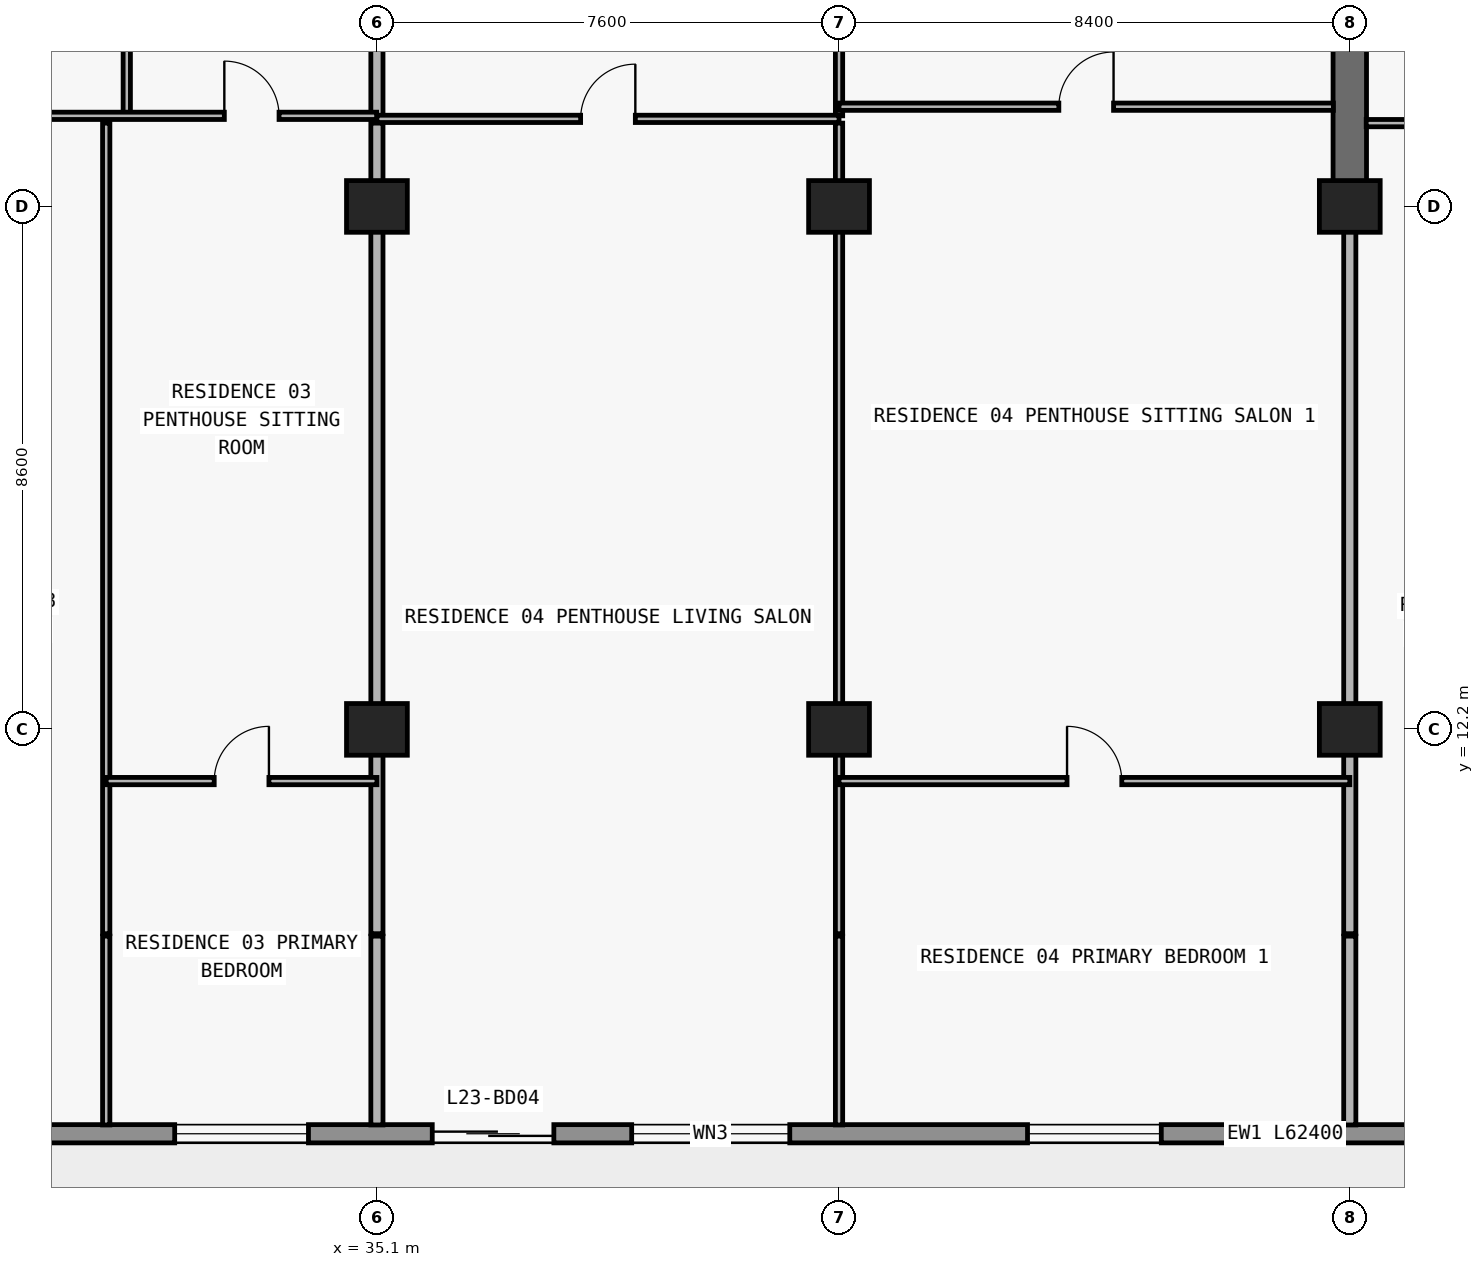
"""IFC4 building model, lengths in metres.
Left out: names, types, materials, properties, quantities, classifications, styles, units other than length and angle.
Written with IfcOpenShell. Run it as: python <this file> out.ifc"""

import sys

from ifc_helpers import new_model, si_unit, direction, frame, frame_2d, origin, origin_2d, place, context, subcontext, project, spatial, rectangle, extrude, element, fill, save


model = new_model("IFC4")
c1 = context("Model", 3, precision=1e-05, world=origin(), true_north=direction((0.0, 1.0)))
c2 = subcontext(c1, "Body", "Model", "MODEL_VIEW")
j1 = project(units=[si_unit("LENGTHUNIT", "METRE"), si_unit("PLANEANGLEUNIT", "RADIAN")], contexts=[c1])
p1 = place(None, origin())
s1 = spatial("IfcSite", under=j1, at=p1, CompositionType="ELEMENT")
p2 = place(p1, origin())
s2 = spatial("IfcBuilding", under=s1, at=p2, CompositionType="ELEMENT")
p3 = place(p2, frame((0.0, 0.0, 87.9)))
s3 = spatial("IfcBuildingStorey", under=s2, at=p3, CompositionType="ELEMENT", Elevation=87.9)
for number, where, z_axis, x_axis in (
    (1, (35.1, 12.2, 0.0), (0.0, 0.0, 1.0), (1.0, 0.0, 0.0)),
    (2, (42.7, 12.2, 0.0), (0.0, 0.0, 1.0), (1.0, 0.0, 0.0)),
    (3, (51.1, 12.2, 0.0), (0.0, 0.0, 1.0), (1.0, 0.0, 0.0)),
    (4, (35.1, 20.8, 0.0), (0.0, 0.0, 1.0), (1.0, 0.0, 0.0)),
    (5, (42.7, 20.8, 0.0), (0.0, 0.0, 1.0), (1.0, 0.0, 0.0)),
    (6, (51.1, 20.8, 0.0), (0.0, 0.0, 1.0), (1.0, 0.0, 0.0)),
):
    element("IfcColumn", number, at=place(p3, frame(where, z_axis=z_axis, x_axis=x_axis)), inside=s3, PredefinedType="COLUMN", context=c2, shape_type="SweptSolid", body=[
        extrude(rectangle(XDim=1.0, YDim=0.85, at=origin_2d()), origin(), (0.0, 0.0, 1.0), 3.05),
    ])
p4 = place(p3, frame((51.1, 20.8, 0.0), z_axis=(0.0, 0.0, 1.0), x_axis=(0.0, 1.0, 0.0)))
e7 = element("IfcWall", 7, at=p4, inside=s3, PredefinedType="SHEAR", context=c2, shape_type="SweptSolid", body=[
    extrude(rectangle(XDim=8.6, YDim=0.55, at=frame_2d((4.3, 0.0))), origin(), (0.0, 0.0, 1.0), 3.05),
])
p5 = place(p3, frame((70.1, 5.55, 0.0), z_axis=(0.0, 0.0, 1.0), x_axis=(-1.0, 0.0, 0.0)))
e8 = element("IfcWall", 8, at=p5, inside=s3, PredefinedType="STANDARD", context=c2, shape_type="SweptSolid", body=[
    extrude(rectangle(XDim=62.4, YDim=0.3, at=frame_2d((31.2, 0.0))), origin(), (0.0, 0.0, 1.0), 3.05),
])
p6 = place(p5, frame((57.226, 0.0, 0.0)))
e9 = element("IfcOpeningElement", 9, at=p6, cuts=e8, PredefinedType="OPENING", context=c2, shape_type="SweptSolid", body=[
    extrude(rectangle(XDim=2.0, YDim=2.3, at=frame_2d((1.0, 1.15))), frame((0.0, 0.16, 0.0), z_axis=(0.0, -1.0, 0.0), x_axis=(1.0, 0.0, 0.0)), (0.0, 0.0, 1.0), 0.32),
])
p7 = place(p5, frame((52.926, 0.0, 0.85)))
e10 = element("IfcOpeningElement", 10, at=p7, cuts=e8, PredefinedType="OPENING", context=c2, shape_type="SweptSolid", body=[
    extrude(rectangle(XDim=2.2, YDim=1.55, at=frame_2d((1.1, 0.775))), frame((0.0, 0.16, 0.0), z_axis=(0.0, -1.0, 0.0), x_axis=(1.0, 0.0, 0.0)), (0.0, 0.0, 1.0), 0.32),
])
p8 = place(p5, frame((48.49, 0.0, 0.0)))
e11 = element("IfcOpeningElement", 11, at=p8, cuts=e8, PredefinedType="OPENING", context=c2, shape_type="SweptSolid", body=[
    extrude(rectangle(XDim=2.0, YDim=2.3, at=frame_2d((1.0, 1.15))), frame((0.0, 0.16, 0.0), z_axis=(0.0, -1.0, 0.0), x_axis=(1.0, 0.0, 0.0)), (0.0, 0.0, 1.0), 0.32),
])
p9 = place(p5, frame((44.39, 0.0, 0.85)))
e12 = element("IfcOpeningElement", 12, at=p9, cuts=e8, PredefinedType="OPENING", context=c2, shape_type="SweptSolid", body=[
    extrude(rectangle(XDim=1.8, YDim=1.55, at=frame_2d((0.9, 0.775))), frame((0.0, 0.16, 0.0), z_axis=(0.0, -1.0, 0.0), x_axis=(1.0, 0.0, 0.0)), (0.0, 0.0, 1.0), 0.32),
])
p10 = place(p5, frame((40.426, 0.0, 0.0)))
e13 = element("IfcOpeningElement", 13, at=p10, cuts=e8, PredefinedType="OPENING", context=c2, shape_type="SweptSolid", body=[
    extrude(rectangle(XDim=2.0, YDim=2.3, at=frame_2d((1.0, 1.15))), frame((0.0, 0.16, 0.0), z_axis=(0.0, -1.0, 0.0), x_axis=(1.0, 0.0, 0.0)), (0.0, 0.0, 1.0), 0.32),
])
p11 = place(p5, frame((36.126, 0.0, 0.85)))
e14 = element("IfcOpeningElement", 14, at=p11, cuts=e8, PredefinedType="OPENING", context=c2, shape_type="SweptSolid", body=[
    extrude(rectangle(XDim=2.2, YDim=1.55, at=frame_2d((1.1, 0.775))), frame((0.0, 0.16, 0.0), z_axis=(0.0, -1.0, 0.0), x_axis=(1.0, 0.0, 0.0)), (0.0, 0.0, 1.0), 0.32),
])
p12 = place(p5, frame((32.09, 0.0, 0.0)))
e15 = element("IfcOpeningElement", 15, at=p12, cuts=e8, PredefinedType="OPENING", context=c2, shape_type="SweptSolid", body=[
    extrude(rectangle(XDim=2.0, YDim=2.3, at=frame_2d((1.0, 1.15))), frame((0.0, 0.16, 0.0), z_axis=(0.0, -1.0, 0.0), x_axis=(1.0, 0.0, 0.0)), (0.0, 0.0, 1.0), 0.32),
])
p13 = place(p5, frame((28.21, 0.0, 0.65)))
e16 = element("IfcOpeningElement", 16, at=p13, cuts=e8, PredefinedType="OPENING", context=c2, shape_type="SweptSolid", body=[
    extrude(rectangle(XDim=2.6, YDim=1.85, at=frame_2d((1.3, 0.925))), frame((0.0, 0.16, 0.0), z_axis=(0.0, -1.0, 0.0), x_axis=(1.0, 0.0, 0.0)), (0.0, 0.0, 1.0), 0.32),
])
p14 = place(p5, frame((22.1, 0.0, 0.85)))
e17 = element("IfcOpeningElement", 17, at=p14, cuts=e8, PredefinedType="OPENING", context=c2, shape_type="SweptSolid", body=[
    extrude(rectangle(XDim=2.2, YDim=1.55, at=frame_2d((1.1, 0.775))), frame((0.0, 0.16, 0.0), z_axis=(0.0, -1.0, 0.0), x_axis=(1.0, 0.0, 0.0)), (0.0, 0.0, 1.0), 0.32),
])
p15 = place(p5, frame((16.026, 0.0, 0.0)))
e18 = element("IfcOpeningElement", 18, at=p15, cuts=e8, PredefinedType="OPENING", context=c2, shape_type="SweptSolid", body=[
    extrude(rectangle(XDim=2.0, YDim=2.3, at=frame_2d((1.0, 1.15))), frame((0.0, 0.16, 0.0), z_axis=(0.0, -1.0, 0.0), x_axis=(1.0, 0.0, 0.0)), (0.0, 0.0, 1.0), 0.32),
])
p16 = place(p5, frame((11.726, 0.0, 0.85)))
e19 = element("IfcOpeningElement", 19, at=p16, cuts=e8, PredefinedType="OPENING", context=c2, shape_type="SweptSolid", body=[
    extrude(rectangle(XDim=2.2, YDim=1.55, at=frame_2d((1.1, 0.775))), frame((0.0, 0.16, 0.0), z_axis=(0.0, -1.0, 0.0), x_axis=(1.0, 0.0, 0.0)), (0.0, 0.0, 1.0), 0.32),
])
p17 = place(p5, frame((7.29, 0.0, 0.0)))
e20 = element("IfcOpeningElement", 20, at=p17, cuts=e8, PredefinedType="OPENING", context=c2, shape_type="SweptSolid", body=[
    extrude(rectangle(XDim=2.0, YDim=2.3, at=frame_2d((1.0, 1.15))), frame((0.0, 0.16, 0.0), z_axis=(0.0, -1.0, 0.0), x_axis=(1.0, 0.0, 0.0)), (0.0, 0.0, 1.0), 0.32),
])
p18 = place(p5, frame((3.19, 0.0, 0.85)))
e21 = element("IfcOpeningElement", 21, at=p18, cuts=e8, PredefinedType="OPENING", context=c2, shape_type="SweptSolid", body=[
    extrude(rectangle(XDim=1.8, YDim=1.55, at=frame_2d((0.9, 0.775))), frame((0.0, 0.16, 0.0), z_axis=(0.0, -1.0, 0.0), x_axis=(1.0, 0.0, 0.0)), (0.0, 0.0, 1.0), 0.32),
])
p19 = place(p3, frame((30.648, 5.695, 0.0), z_axis=(0.0, 0.0, 1.0), x_axis=(0.0, 1.0, 0.0)))
e22 = element("IfcWall", 22, at=p19, inside=s3, PredefinedType="PARTITIONING", context=c2, shape_type="SweptSolid", body=[
    extrude(rectangle(XDim=3.105, YDim=0.12, at=frame_2d((1.552, 0.0))), origin(), (0.0, 0.0, 1.0), 3.05),
])
p20 = place(p3, frame((30.648, 8.84, 0.0), z_axis=(0.0, 0.0, 1.0), x_axis=(0.0, 1.0, 0.0)))
e23 = element("IfcWall", 23, at=p20, inside=s3, PredefinedType="PARTITIONING", context=c2, shape_type="SweptSolid", body=[
    extrude(rectangle(XDim=13.33, YDim=0.12, at=frame_2d((6.665, 0.0))), origin(), (0.0, 0.0, 1.0), 3.05),
])
p21 = place(p3, frame((30.986, 22.29, 0.0), z_axis=(0.0, 0.0, 1.0), x_axis=(0.0, 1.0, 0.0)))
e24 = element("IfcWall", 24, at=p21, inside=s3, PredefinedType="PARTITIONING", context=c2, shape_type="SweptSolid", body=[
    extrude(rectangle(XDim=4.69, YDim=0.12, at=frame_2d((2.345, 0.0))), origin(), (0.0, 0.0, 1.0), 3.05),
])
p22 = place(p21, frame((1.895, 0.0, 0.0)))
e25 = element("IfcOpeningElement", 25, at=p22, cuts=e24, PredefinedType="OPENING", context=c2, shape_type="SweptSolid", body=[
    extrude(rectangle(XDim=0.9, YDim=2.15, at=frame_2d((0.45, 1.075))), frame((0.0, 0.07, 0.0), z_axis=(0.0, -1.0, 0.0), x_axis=(1.0, 0.0, 0.0)), (0.0, 0.0, 1.0), 0.14),
])
p23 = place(p3, frame((35.1, 5.695, 0.0), z_axis=(0.0, 0.0, 1.0), x_axis=(0.0, 1.0, 0.0)))
e26 = element("IfcWall", 26, at=p23, inside=s3, PredefinedType="PARTITIONING", context=c2, shape_type="SweptSolid", body=[
    extrude(rectangle(XDim=3.105, YDim=0.2, at=frame_2d((1.552, 0.0))), origin(), (0.0, 0.0, 1.0), 3.05),
])
p24 = place(p3, frame((35.1, 8.84, 0.0), z_axis=(0.0, 0.0, 1.0), x_axis=(0.0, 1.0, 0.0)))
e27 = element("IfcWall", 27, at=p24, inside=s3, PredefinedType="PARTITIONING", context=c2, shape_type="SweptSolid", body=[
    extrude(rectangle(XDim=13.33, YDim=0.2, at=frame_2d((6.665, 0.0))), origin(), (0.0, 0.0, 1.0), 2.174),
])
p25 = place(p3, frame((35.1, 22.29, 0.0), z_axis=(0.0, 0.0, 1.0), x_axis=(0.0, 1.0, 0.0)))
e28 = element("IfcWall", 28, at=p25, inside=s3, PredefinedType="PARTITIONING", context=c2, shape_type="SweptSolid", body=[
    extrude(rectangle(XDim=4.69, YDim=0.2, at=frame_2d((2.345, 0.0))), origin(), (0.0, 0.0, 1.0), 2.174),
])
p26 = place(p3, frame((42.7, 5.695, 0.0), z_axis=(0.0, 0.0, 1.0), x_axis=(0.0, 1.0, 0.0)))
e29 = element("IfcWall", 29, at=p26, inside=s3, PredefinedType="PARTITIONING", context=c2, shape_type="SweptSolid", body=[
    extrude(rectangle(XDim=3.105, YDim=0.12, at=frame_2d((1.552, 0.0))), origin(), (0.0, 0.0, 1.0), 3.05),
])
p27 = place(p3, frame((42.7, 8.84, 0.0), z_axis=(0.0, 0.0, 1.0), x_axis=(0.0, 1.0, 0.0)))
e30 = element("IfcWall", 30, at=p27, inside=s3, PredefinedType="PARTITIONING", context=c2, shape_type="SweptSolid", body=[
    extrude(rectangle(XDim=13.33, YDim=0.12, at=frame_2d((6.665, 0.0))), origin(), (0.0, 0.0, 1.0), 2.174),
])
p28 = place(p3, frame((42.7, 22.29, 0.0), z_axis=(0.0, 0.0, 1.0), x_axis=(0.0, 1.0, 0.0)))
e31 = element("IfcWall", 31, at=p28, inside=s3, PredefinedType="PARTITIONING", context=c2, shape_type="SweptSolid", body=[
    extrude(rectangle(XDim=4.69, YDim=0.12, at=frame_2d((2.345, 0.0))), origin(), (0.0, 0.0, 1.0), 2.174),
])
p29 = place(p28, frame((1.9, 0.0, 0.0)))
e32 = element("IfcOpeningElement", 32, at=p29, cuts=e31, PredefinedType="OPENING", context=c2, shape_type="SweptSolid", body=[
    extrude(rectangle(XDim=0.9, YDim=2.124, at=frame_2d((0.45, 1.062))), frame((0.0, 0.07, 0.0), z_axis=(0.0, -1.0, 0.0), x_axis=(1.0, 0.0, 0.0)), (0.0, 0.0, 1.0), 0.14),
])
p30 = place(p3, frame((51.1, 5.695, 0.0), z_axis=(0.0, 0.0, 1.0), x_axis=(0.0, 1.0, 0.0)))
e33 = element("IfcWall", 33, at=p30, inside=s3, PredefinedType="PARTITIONING", context=c2, shape_type="SweptSolid", body=[
    extrude(rectangle(XDim=3.105, YDim=0.2, at=frame_2d((1.552, 0.0))), origin(), (0.0, 0.0, 1.0), 3.05),
])
p31 = place(p3, frame((51.1, 8.84, 0.0), z_axis=(0.0, 0.0, 1.0), x_axis=(0.0, 1.0, 0.0)))
e34 = element("IfcWall", 34, at=p31, inside=s3, PredefinedType="PARTITIONING", context=c2, shape_type="SweptSolid", body=[
    extrude(rectangle(XDim=11.955, YDim=0.2, at=frame_2d((5.978, 0.0))), origin(), (0.0, 0.0, 1.0), 2.174),
])
p32 = place(p3, frame((30.648, 11.35, 0.0), z_axis=(0.0, 0.0, 1.0), x_axis=(1.0, 0.0, 0.0)))
e35 = element("IfcWall", 35, at=p32, inside=s3, PredefinedType="PARTITIONING", context=c2, shape_type="SweptSolid", body=[
    extrude(rectangle(XDim=4.452, YDim=0.12, at=frame_2d((2.226, 0.0))), origin(), (0.0, 0.0, 1.0), 3.05),
])
p33 = place(p32, frame((1.776, 0.0, 0.0)))
e36 = element("IfcOpeningElement", 36, at=p33, cuts=e35, PredefinedType="OPENING", context=c2, shape_type="SweptSolid", body=[
    extrude(rectangle(XDim=0.9, YDim=2.15, at=frame_2d((0.45, 1.075))), frame((0.0, 0.07, 0.0), z_axis=(0.0, -1.0, 0.0), x_axis=(1.0, 0.0, 0.0)), (0.0, 0.0, 1.0), 0.14),
])
p34 = place(p3, frame((42.7, 11.35, 0.0), z_axis=(0.0, 0.0, 1.0), x_axis=(1.0, 0.0, 0.0)))
e37 = element("IfcWall", 37, at=p34, inside=s3, PredefinedType="PARTITIONING", context=c2, shape_type="SweptSolid", body=[
    extrude(rectangle(XDim=8.4, YDim=0.12, at=frame_2d((4.2, 0.0))), origin(), (0.0, 0.0, 1.0), 3.05),
])
p35 = place(p34, frame((3.75, 0.0, 0.0)))
e38 = element("IfcOpeningElement", 38, at=p35, cuts=e37, PredefinedType="OPENING", context=c2, shape_type="SweptSolid", body=[
    extrude(rectangle(XDim=0.9, YDim=2.15, at=frame_2d((0.45, 1.075))), frame((0.0, 0.07, 0.0), z_axis=(0.0, -1.0, 0.0), x_axis=(1.0, 0.0, 0.0)), (0.0, 0.0, 1.0), 0.14),
])
p36 = place(p3, frame((51.37, 22.17, 0.0), z_axis=(0.0, 0.0, 1.0), x_axis=(1.0, 0.0, 0.0)))
e39 = element("IfcWall", 39, at=p36, inside=s3, PredefinedType="PARTITIONING", context=c2, shape_type="SweptSolid", body=[
    extrude(rectangle(XDim=4.516, YDim=0.12, at=frame_2d((2.258, 0.0))), origin(), (0.0, 0.0, 1.0), 3.05),
])
p37 = place(p36, frame((1.389, 0.0, 0.0)))
e40 = element("IfcOpeningElement", 40, at=p37, cuts=e39, PredefinedType="OPENING", context=c2, shape_type="SweptSolid", body=[
    extrude(rectangle(XDim=0.9, YDim=2.15, at=frame_2d((0.45, 1.075))), frame((0.0, 0.07, 0.0), z_axis=(0.0, -1.0, 0.0), x_axis=(1.0, 0.0, 0.0)), (0.0, 0.0, 1.0), 0.14),
])
p38 = place(p3, frame((35.1, 22.24, 0.0), z_axis=(0.0, 0.0, 1.0), x_axis=(1.0, 0.0, 0.0)))
e41 = element("IfcWall", 41, at=p38, inside=s3, PredefinedType="PARTITIONING", context=c2, shape_type="SweptSolid", body=[
    extrude(rectangle(XDim=7.6, YDim=0.12, at=frame_2d((3.8, 0.0))), origin(), (0.0, 0.0, 1.0), 3.05),
])
p39 = place(p38, frame((3.35, 0.0, 0.0)))
e42 = element("IfcOpeningElement", 42, at=p39, cuts=e41, PredefinedType="OPENING", context=c2, shape_type="SweptSolid", body=[
    extrude(rectangle(XDim=0.9, YDim=2.15, at=frame_2d((0.45, 1.075))), frame((0.0, 0.07, 0.0), z_axis=(0.0, -1.0, 0.0), x_axis=(1.0, 0.0, 0.0)), (0.0, 0.0, 1.0), 0.14),
])
p40 = place(p3, frame((26.97, 22.29, 0.0), z_axis=(0.0, 0.0, 1.0), x_axis=(1.0, 0.0, 0.0)))
e43 = element("IfcWall", 43, at=p40, inside=s3, PredefinedType="PARTITIONING", context=c2, shape_type="SweptSolid", body=[
    extrude(rectangle(XDim=8.125, YDim=0.12, at=frame_2d((4.062, 0.0))), origin(), (0.0, 0.0, 1.0), 3.05),
])
p41 = place(p40, frame((1.389, 0.0, 0.0)))
e44 = element("IfcOpeningElement", 44, at=p41, cuts=e43, PredefinedType="OPENING", context=c2, shape_type="SweptSolid", body=[
    extrude(rectangle(XDim=0.9, YDim=2.15, at=frame_2d((0.45, 1.075))), frame((0.0, 0.07, 0.0), z_axis=(0.0, -1.0, 0.0), x_axis=(1.0, 0.0, 0.0)), (0.0, 0.0, 1.0), 0.14),
])
p42 = place(p40, frame((5.621, 0.0, 0.0)))
e45 = element("IfcOpeningElement", 45, at=p42, cuts=e43, PredefinedType="OPENING", context=c2, shape_type="SweptSolid", body=[
    extrude(rectangle(XDim=0.9, YDim=2.15, at=frame_2d((0.45, 1.075))), frame((0.0, 0.07, 0.0), z_axis=(0.0, -1.0, 0.0), x_axis=(1.0, 0.0, 0.0)), (0.0, 0.0, 1.0), 0.14),
])
p43 = place(p3, frame((42.7, 22.44, 0.0), z_axis=(0.0, 0.0, 1.0), x_axis=(1.0, 0.0, 0.0)))
e46 = element("IfcWall", 46, at=p43, inside=s3, PredefinedType="PARTITIONING", context=c2, shape_type="SweptSolid", body=[
    extrude(rectangle(XDim=8.13, YDim=0.12, at=frame_2d((4.065, 0.0))), origin(), (0.0, 0.0, 1.0), 3.05),
])
p44 = place(p43, frame((3.615, 0.0, 0.0)))
e47 = element("IfcOpeningElement", 47, at=p44, cuts=e46, PredefinedType="OPENING", context=c2, shape_type="SweptSolid", body=[
    extrude(rectangle(XDim=0.9, YDim=2.15, at=frame_2d((0.45, 1.075))), frame((0.0, 0.07, 0.0), z_axis=(0.0, -1.0, 0.0), x_axis=(1.0, 0.0, 0.0)), (0.0, 0.0, 1.0), 0.14),
])
p45 = place(p11, origin())
e48 = element("IfcWindow", 48, at=p45, inside=s3, PartitioningType="SINGLE_PANEL", PredefinedType="WINDOW", context=c2, shape_type="SweptSolid", body=[
    extrude(rectangle(XDim=2.2, YDim=1.55, at=frame_2d((1.1, 0.775))), frame((0.0, 0.03, 0.0), z_axis=(0.0, -1.0, 0.0), x_axis=(1.0, 0.0, 0.0)), (0.0, 0.0, 1.0), 0.06),
])
fill(e14, e48)
p46 = place(p12, origin())
e49 = element("IfcDoor", 49, at=p46, inside=s3, OperationType="DOUBLE_DOOR_SLIDING", PredefinedType="DOOR", context=c2, shape_type="SweptSolid", body=[
    extrude(rectangle(XDim=2.0, YDim=2.3, at=frame_2d((1.0, 1.15))), frame((0.0, 0.025, 0.0), z_axis=(0.0, -1.0, 0.0), x_axis=(1.0, 0.0, 0.0)), (0.0, 0.0, 1.0), 0.05),
])
fill(e15, e49)
p47 = place(p13, origin())
e50 = element("IfcWindow", 50, at=p47, inside=s3, PartitioningType="SINGLE_PANEL", PredefinedType="WINDOW", context=c2, shape_type="SweptSolid", body=[
    extrude(rectangle(XDim=2.6, YDim=1.85, at=frame_2d((1.3, 0.925))), frame((0.0, 0.03, 0.0), z_axis=(0.0, -1.0, 0.0), x_axis=(1.0, 0.0, 0.0)), (0.0, 0.0, 1.0), 0.06),
])
fill(e16, e50)
p48 = place(p14, origin())
e51 = element("IfcWindow", 51, at=p48, inside=s3, PartitioningType="SINGLE_PANEL", PredefinedType="WINDOW", context=c2, shape_type="SweptSolid", body=[
    extrude(rectangle(XDim=2.2, YDim=1.55, at=frame_2d((1.1, 0.775))), frame((0.0, 0.03, 0.0), z_axis=(0.0, -1.0, 0.0), x_axis=(1.0, 0.0, 0.0)), (0.0, 0.0, 1.0), 0.06),
])
fill(e17, e51)
p49 = place(p42, origin())
e52 = element("IfcDoor", 52, at=p49, inside=s3, OperationType="SINGLE_SWING_LEFT", PredefinedType="DOOR", context=c2, shape_type="SweptSolid", body=[
    extrude(rectangle(XDim=0.9, YDim=2.15, at=frame_2d((0.45, 1.075))), frame((0.0, 0.025, 0.0), z_axis=(0.0, -1.0, 0.0), x_axis=(1.0, 0.0, 0.0)), (0.0, 0.0, 1.0), 0.05),
])
fill(e45, e52)
p50 = place(p33, origin())
e53 = element("IfcDoor", 53, at=p50, inside=s3, OperationType="SINGLE_SWING_RIGHT", PredefinedType="DOOR", context=c2, shape_type="SweptSolid", body=[
    extrude(rectangle(XDim=0.9, YDim=2.15, at=frame_2d((0.45, 1.075))), frame((0.0, 0.025, 0.0), z_axis=(0.0, -1.0, 0.0), x_axis=(1.0, 0.0, 0.0)), (0.0, 0.0, 1.0), 0.05),
])
fill(e36, e53)
p51 = place(p39, origin())
e54 = element("IfcDoor", 54, at=p51, inside=s3, OperationType="SINGLE_SWING_RIGHT", PredefinedType="DOOR", context=c2, shape_type="SweptSolid", body=[
    extrude(rectangle(XDim=0.9, YDim=2.15, at=frame_2d((0.45, 1.075))), frame((0.0, 0.025, 0.0), z_axis=(0.0, -1.0, 0.0), x_axis=(1.0, 0.0, 0.0)), (0.0, 0.0, 1.0), 0.05),
])
fill(e42, e54)
p52 = place(p44, origin())
e55 = element("IfcDoor", 55, at=p52, inside=s3, OperationType="SINGLE_SWING_RIGHT", PredefinedType="DOOR", context=c2, shape_type="SweptSolid", body=[
    extrude(rectangle(XDim=0.9, YDim=2.15, at=frame_2d((0.45, 1.075))), frame((0.0, 0.025, 0.0), z_axis=(0.0, -1.0, 0.0), x_axis=(1.0, 0.0, 0.0)), (0.0, 0.0, 1.0), 0.05),
])
fill(e47, e55)
p53 = place(p35, origin())
e56 = element("IfcDoor", 56, at=p53, inside=s3, OperationType="SINGLE_SWING_LEFT", PredefinedType="DOOR", context=c2, shape_type="SweptSolid", body=[
    extrude(rectangle(XDim=0.9, YDim=2.15, at=frame_2d((0.45, 1.075))), frame((0.0, 0.025, 0.0), z_axis=(0.0, -1.0, 0.0), x_axis=(1.0, 0.0, 0.0)), (0.0, 0.0, 1.0), 0.05),
])
fill(e38, e56)
save(model, sys.argv[1])
